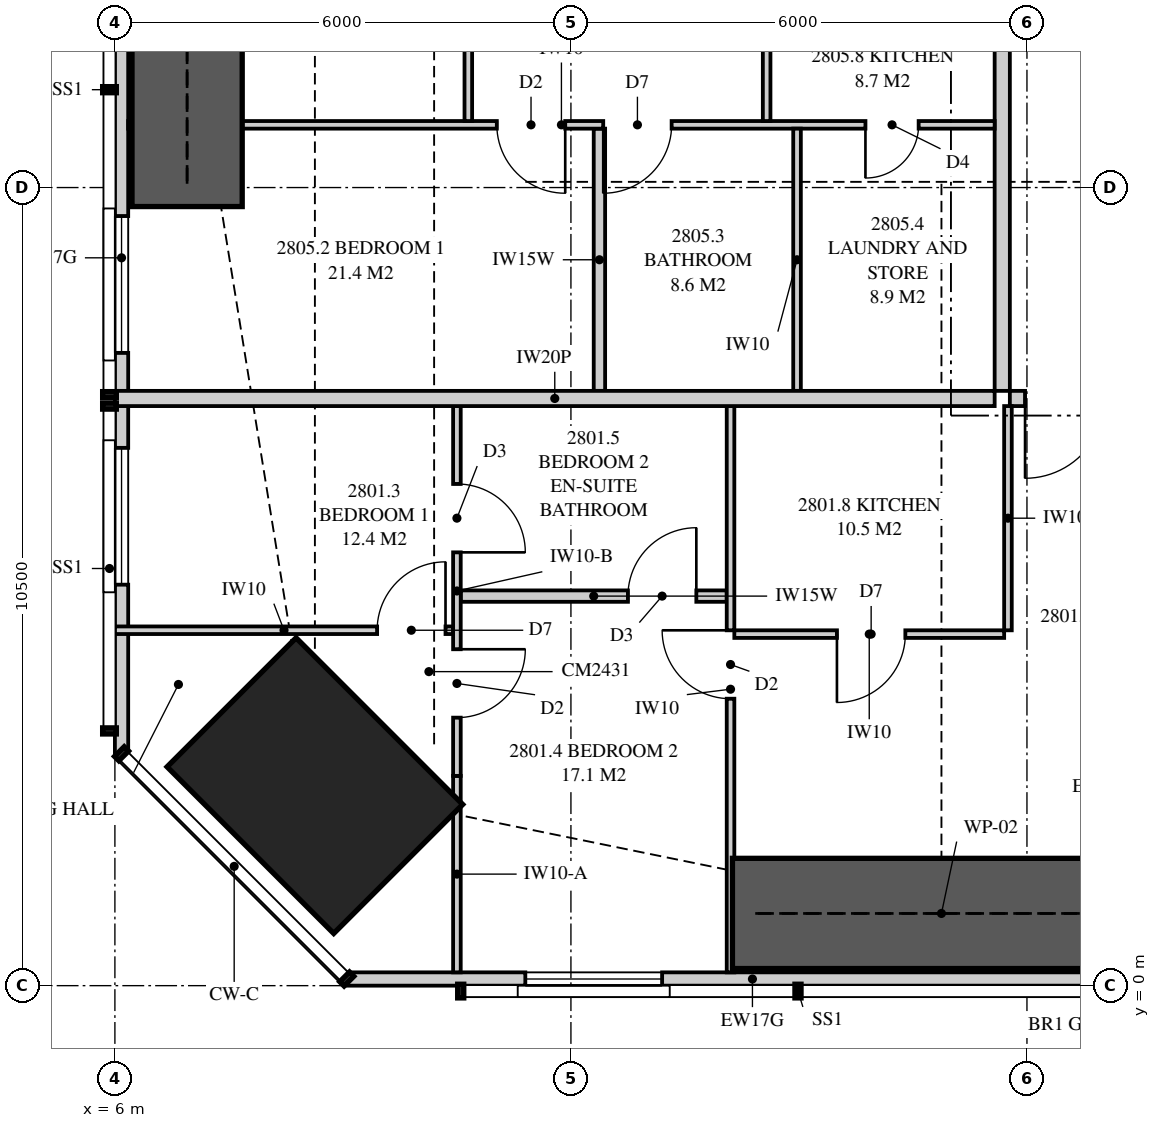
"""IFC4 building model, lengths in metres.
Left out: names, types, materials, properties, quantities, classifications, styles, units other than length and angle.
Written with IfcOpenShell. Run it as: python <this file> out.ifc"""

import sys

from ifc_helpers import new_model, si_unit, direction, frame, frame_2d, origin, origin_2d, place, context, subcontext, project, spatial, polyline, rectangle, outline, extrude, element, fill, save


model = new_model("IFC4")
c1 = context("Model", 3, precision=1e-05, world=origin(), true_north=direction((0.0, 1.0)))
c2 = subcontext(c1, "Body", "Model", "MODEL_VIEW")
j1 = project(units=[si_unit("LENGTHUNIT", "METRE"), si_unit("PLANEANGLEUNIT", "RADIAN")], contexts=[c1])
p1 = place(None, origin())
s1 = spatial("IfcSite", under=j1, at=p1, CompositionType="ELEMENT")
p2 = place(p1, origin())
s2 = spatial("IfcBuilding", under=s1, at=p2, CompositionType="ELEMENT")
p3 = place(p2, frame((0.0, 0.0, 104.85)))
s3 = spatial("IfcBuildingStorey", under=s2, at=p3, CompositionType="ELEMENT", Elevation=104.85)
p4 = place(p3, frame((8.631, 2.631, 0.0), z_axis=(0.0, 0.0, 1.0), x_axis=(0.707106781187, 0.707106781187, 0.0)))
e1 = element("IfcColumn", 1, at=p4, inside=s3, PredefinedType="COLUMN", context=c2, shape_type="SweptSolid", body=[
    extrude(rectangle(XDim=2.4, YDim=3.1, at=origin_2d()), origin(), (0.0, 0.0, 1.0), 3.35),
])
p5 = place(p3, frame((9.051, 0.087, 0.0), z_axis=(0.0, 0.0, 1.0), x_axis=(1.0, 0.0, 0.0)))
e2 = element("IfcWall", 2, at=p5, inside=s3, PredefinedType="SOLIDWALL", context=c2, shape_type="SweptSolid", body=[
    extrude(outline(polyline([(0.0, 0.0), (10.674, 0.0), (10.674, 2.15), (7.824, 2.15), (7.824, 3.11), (7.666, 3.11), (7.666, 2.15), (7.62, 2.15), (7.62, 3.11), (0.0, 3.11), (0.0, 0.0)])), frame((0.0, 0.087, 0.0), z_axis=(0.0, -1.0, 0.0), x_axis=(1.0, 0.0, 0.0)), (0.0, 0.0, 1.0), 0.175),
])
p6 = place(p5, frame((2.349, 0.0, 0.4)))
e3 = element("IfcOpeningElement", 3, at=p6, cuts=e2, PredefinedType="OPENING", context=c2, shape_type="SweptSolid", body=[
    extrude(rectangle(XDim=1.8, YDim=1.7, at=frame_2d((0.9, 0.85))), frame((0.0, 0.097, 0.0), z_axis=(0.0, -1.0, 0.0), x_axis=(1.0, 0.0, 0.0)), (0.0, 0.0, 1.0), 0.195),
])
p7 = place(p3, frame((6.087, 16.1, 0.0), z_axis=(0.0, 0.0, 1.0), x_axis=(0.0, -1.0, 0.0)))
e4 = element("IfcWall", 4, at=p7, inside=s3, PredefinedType="SOLIDWALL", context=c2, shape_type="SweptSolid", body=[
    extrude(outline(polyline([(0.0, 0.0), (13.049, 0.0), (13.049, 3.11), (3.319, 3.11), (3.319, 2.15), (3.226, 2.15), (3.226, 3.11), (3.1, 3.11), (3.1, 2.15), (0.0, 2.15), (0.0, 0.0)])), frame((0.0, 0.087, 0.0), z_axis=(0.0, -1.0, 0.0), x_axis=(1.0, 0.0, 0.0)), (0.0, 0.0, 1.0), 0.175),
])
p8 = place(p7, frame((5.975, 0.0, 0.4)))
e5 = element("IfcOpeningElement", 5, at=p8, cuts=e4, PredefinedType="OPENING", context=c2, shape_type="SweptSolid", body=[
    extrude(rectangle(XDim=1.8, YDim=1.7, at=frame_2d((0.9, 0.85))), frame((0.0, 0.097, 0.0), z_axis=(0.0, -1.0, 0.0), x_axis=(1.0, 0.0, 0.0)), (0.0, 0.0, 1.0), 0.195),
])
p9 = place(p7, frame((9.025, 0.0, 0.4)))
e6 = element("IfcOpeningElement", 6, at=p9, cuts=e4, PredefinedType="OPENING", context=c2, shape_type="SweptSolid", body=[
    extrude(rectangle(XDim=1.8, YDim=1.7, at=frame_2d((0.9, 0.85))), frame((0.0, 0.097, 0.0), z_axis=(0.0, -1.0, 0.0), x_axis=(1.0, 0.0, 0.0)), (0.0, 0.0, 1.0), 0.195),
])
p10 = place(p3, frame((17.775, 7.725, 0.0), z_axis=(0.0, 0.0, 1.0), x_axis=(1.0, 0.0, 0.0)))
e7 = element("IfcWall", 7, at=p10, inside=s3, PredefinedType="PARTITIONING", context=c2, shape_type="SweptSolid", body=[
    extrude(rectangle(XDim=8.225, YDim=0.2, at=frame_2d((4.113, 0.0))), origin(), (0.0, 0.0, 1.0), 3.11),
])
p11 = place(p10, frame((0.2, 0.0, 0.0)))
e8 = element("IfcOpeningElement", 8, at=p11, cuts=e7, PredefinedType="OPENING", context=c2, shape_type="SweptSolid", body=[
    extrude(rectangle(XDim=1.05, YDim=2.2, at=frame_2d((0.525, 1.1))), frame((0.0, 0.11, 0.0), z_axis=(0.0, -1.0, 0.0), x_axis=(1.0, 0.0, 0.0)), (0.0, 0.0, 1.0), 0.22),
])
p12 = place(p3, frame((10.5, 0.175, 0.0), z_axis=(0.0, 0.0, 1.0), x_axis=(0.0, 1.0, 0.0)))
e9 = element("IfcWall", 9, at=p12, inside=s3, PredefinedType="PARTITIONING", context=c2, shape_type="SweptSolid", body=[
    extrude(outline(polyline([(0.0, 0.0), (2.585, 0.0), (2.585, 2.15), (1.198, 2.15), (1.198, 3.11), (0.0, 3.11), (0.0, 0.0)])), frame((0.0, 0.05, 0.0), z_axis=(0.0, -1.0, 0.0), x_axis=(1.0, 0.0, 0.0)), (0.0, 0.0, 1.0), 0.1),
])
p13 = place(p3, frame((10.5, 2.76, 0.0), z_axis=(0.0, 0.0, 1.0), x_axis=(0.0, 1.0, 0.0)))
e10 = element("IfcWall", 10, at=p13, inside=s3, PredefinedType="PARTITIONING", context=c2, shape_type="SweptSolid", body=[
    extrude(outline(polyline([(0.0, 0.0), (4.865, 0.0), (4.865, 2.51), (0.368, 2.51), (0.368, 2.15), (0.0, 2.15), (0.0, 0.0)])), frame((0.0, 0.05, 0.0), z_axis=(0.0, -1.0, 0.0), x_axis=(1.0, 0.0, 0.0)), (0.0, 0.0, 1.0), 0.1),
])
p14 = place(p13, frame((0.766, 0.0, 0.0)))
e11 = element("IfcOpeningElement", 11, at=p14, cuts=e10, PredefinedType="OPENING", context=c2, shape_type="SweptSolid", body=[
    extrude(rectangle(XDim=0.9, YDim=2.1, at=frame_2d((0.45, 1.05))), frame((0.0, 0.06, 0.0), z_axis=(0.0, -1.0, 0.0), x_axis=(1.0, 0.0, 0.0)), (0.0, 0.0, 1.0), 0.12),
])
p15 = place(p13, frame((2.941, 0.0, 0.0)))
e12 = element("IfcOpeningElement", 12, at=p15, cuts=e10, PredefinedType="OPENING", context=c2, shape_type="SweptSolid", body=[
    extrude(rectangle(XDim=0.9, YDim=2.1, at=frame_2d((0.45, 1.05))), frame((0.0, 0.06, 0.0), z_axis=(0.0, -1.0, 0.0), x_axis=(1.0, 0.0, 0.0)), (0.0, 0.0, 1.0), 0.12),
])
p16 = place(p3, frame((14.1, 0.175, 0.0), z_axis=(0.0, 0.0, 1.0), x_axis=(0.0, 1.0, 0.0)))
e13 = element("IfcWall", 13, at=p16, inside=s3, PredefinedType="PARTITIONING", context=c2, shape_type="SweptSolid", body=[
    extrude(outline(polyline([(0.0, 0.0), (7.45, 0.0), (7.45, 3.11), (2.219, 3.11), (2.219, 2.15), (0.463, 2.15), (0.463, 3.11), (0.0, 3.11), (0.0, 0.0)])), frame((0.0, 0.05, 0.0), z_axis=(0.0, -1.0, 0.0), x_axis=(1.0, 0.0, 0.0)), (0.0, 0.0, 1.0), 0.1),
])
p17 = place(p16, frame((3.6, 0.0, 0.0)))
e14 = element("IfcOpeningElement", 14, at=p17, cuts=e13, PredefinedType="OPENING", context=c2, shape_type="SweptSolid", body=[
    extrude(rectangle(XDim=0.9, YDim=2.1, at=frame_2d((0.45, 1.05))), frame((0.0, 0.06, 0.0), z_axis=(0.0, -1.0, 0.0), x_axis=(1.0, 0.0, 0.0)), (0.0, 0.0, 1.0), 0.12),
])
p18 = place(p3, frame((6.0, 4.676, 0.0), z_axis=(0.0, 0.0, 1.0), x_axis=(1.0, 0.0, 0.0)))
e15 = element("IfcWall", 15, at=p18, inside=s3, PredefinedType="PARTITIONING", context=c2, shape_type="SweptSolid", body=[
    extrude(outline(polyline([(0.0, 0.0), (4.45, 0.0), (4.45, 3.11), (4.45, 2.51), (3.171, 2.51), (3.171, 2.15), (1.429, 2.15), (1.429, 3.11), (0.0, 3.11), (0.0, 0.0)])), frame((0.0, 0.05, 0.0), z_axis=(0.0, -1.0, 0.0), x_axis=(1.0, 0.0, 0.0)), (0.0, 0.0, 1.0), 0.1),
])
p19 = place(p18, frame((3.45, 0.0, 0.0)))
e16 = element("IfcOpeningElement", 16, at=p19, cuts=e15, PredefinedType="OPENING", context=c2, shape_type="SweptSolid", body=[
    extrude(rectangle(XDim=0.9, YDim=2.1, at=frame_2d((0.45, 1.05))), frame((0.0, 0.06, 0.0), z_axis=(0.0, -1.0, 0.0), x_axis=(1.0, 0.0, 0.0)), (0.0, 0.0, 1.0), 0.12),
])
p20 = place(p3, frame((10.55, 5.125, 0.0), z_axis=(0.0, 0.0, 1.0), x_axis=(1.0, 0.0, 0.0)))
e17 = element("IfcWall", 17, at=p20, inside=s3, PredefinedType="PLUMBINGWALL", context=c2, shape_type="SweptSolid", body=[
    extrude(outline(polyline([(0.0, 0.0), (3.5, 0.0), (3.5, 3.11), (0.935, 3.11), (0.935, 2.51), (0.0, 2.51), (0.0, 3.11), (0.0, 0.0)])), frame((0.0, 0.075, 0.0), z_axis=(0.0, -1.0, 0.0), x_axis=(1.0, 0.0, 0.0)), (0.0, 0.0, 1.0), 0.15),
])
p21 = place(p20, frame((2.2, 0.0, 0.0)))
e18 = element("IfcOpeningElement", 18, at=p21, cuts=e17, PredefinedType="OPENING", context=c2, shape_type="SweptSolid", body=[
    extrude(rectangle(XDim=0.9, YDim=2.1, at=frame_2d((0.45, 1.05))), frame((0.0, 0.085, 0.0), z_axis=(0.0, -1.0, 0.0), x_axis=(1.0, 0.0, 0.0)), (0.0, 0.0, 1.0), 0.17),
])
p22 = place(p3, frame((14.15, 4.625, 0.0), z_axis=(0.0, 0.0, 1.0), x_axis=(1.0, 0.0, 0.0)))
e19 = element("IfcWall", 19, at=p22, inside=s3, PredefinedType="PARTITIONING", context=c2, shape_type="SweptSolid", body=[
    extrude(outline(polyline([(0.0, 0.0), (3.55, 0.0), (3.55, 3.11), (3.012, 3.11), (3.012, 2.541), (2.438, 2.541), (2.438, 3.11), (0.0, 3.11), (0.0, 0.0)])), frame((0.0, 0.05, 0.0), z_axis=(0.0, -1.0, 0.0), x_axis=(1.0, 0.0, 0.0)), (0.0, 0.0, 1.0), 0.1),
])
p23 = place(p22, frame((1.35, 0.0, 0.0)))
e20 = element("IfcOpeningElement", 20, at=p23, cuts=e19, PredefinedType="OPENING", context=c2, shape_type="SweptSolid", body=[
    extrude(rectangle(XDim=0.9, YDim=2.1, at=frame_2d((0.45, 1.05))), frame((0.0, 0.06, 0.0), z_axis=(0.0, -1.0, 0.0), x_axis=(1.0, 0.0, 0.0)), (0.0, 0.0, 1.0), 0.12),
])
p24 = place(p3, frame((17.75, 4.675, 0.0), z_axis=(0.0, 0.0, 1.0), x_axis=(0.0, 1.0, 0.0)))
e21 = element("IfcWall", 21, at=p24, inside=s3, PredefinedType="PARTITIONING", context=c2, shape_type="SweptSolid", body=[
    extrude(rectangle(XDim=2.95, YDim=0.1, at=frame_2d((1.475, 0.0))), origin(), (0.0, 0.0, 1.0), 3.11),
])
p25 = place(p3, frame((6.0, 7.725, 0.0), z_axis=(0.0, 0.0, 1.0), x_axis=(1.0, 0.0, 0.0)))
e22 = element("IfcWall", 22, at=p25, inside=s3, PredefinedType="PARTITIONING", context=c2, shape_type="SweptSolid", body=[
    extrude(outline(polyline([(0.0, 0.0), (11.575, 0.0), (11.575, 3.11), (11.212, 3.11), (11.212, 2.541), (10.538, 2.541), (10.538, 3.11), (5.51, 3.11), (5.51, 2.51), (2.969, 2.51), (2.969, 2.541), (2.727, 2.541), (2.727, 2.15), (0.884, 2.15), (0.884, 3.11), (0.0, 3.11), (0.0, 0.0)])), frame((0.0, 0.1, 0.0), z_axis=(0.0, -1.0, 0.0), x_axis=(1.0, 0.0, 0.0)), (0.0, 0.0, 1.0), 0.2),
])
p26 = place(p3, frame((17.675, 7.825, 0.0), z_axis=(0.0, 0.0, 1.0), x_axis=(0.0, 1.0, 0.0)))
e23 = element("IfcWall", 23, at=p26, inside=s3, PredefinedType="PARTITIONING", context=c2, shape_type="SweptSolid", body=[
    extrude(outline(polyline([(0.0, 0.0), (6.637, 0.0), (6.637, 3.11), (3.087, 3.11), (3.087, 2.541), (2.413, 2.541), (2.413, 3.11), (0.0, 3.11), (0.0, 0.0)])), frame((0.0, 0.1, 0.0), z_axis=(0.0, -1.0, 0.0), x_axis=(1.0, 0.0, 0.0)), (0.0, 0.0, 1.0), 0.2),
])
p27 = place(p3, frame((6.175, 11.325, 0.0), z_axis=(0.0, 0.0, 1.0), x_axis=(1.0, 0.0, 0.0)))
e24 = element("IfcWall", 24, at=p27, inside=s3, PredefinedType="PARTITIONING", context=c2, shape_type="SweptSolid", body=[
    extrude(outline(polyline([(0.175, 3.11), (0.0, 3.11), (0.0, 0.0), (0.529, 0.0), (0.529, 0.325), (1.021, 0.325), (1.021, 0.0), (11.4, 0.0), (11.4, 3.11), (5.285, 3.11), (5.285, 2.51), (2.765, 2.51), (2.765, 3.11), (2.744, 3.11), (2.744, 2.541), (2.169, 2.541), (2.169, 3.11), (1.918, 3.11), (1.918, 2.15), (1.021, 2.15), (1.021, 1.825), (0.529, 1.825), (0.529, 2.15), (0.175, 2.15), (0.175, 3.11)])), frame((0.0, 0.05, 0.0), z_axis=(0.0, -1.0, 0.0), x_axis=(1.0, 0.0, 0.0)), (0.0, 0.0, 1.0), 0.1),
])
p28 = place(p27, frame((4.85, 0.0, 0.0)))
e25 = element("IfcOpeningElement", 25, at=p28, cuts=e24, PredefinedType="OPENING", context=c2, shape_type="SweptSolid", body=[
    extrude(rectangle(XDim=0.9, YDim=2.1, at=frame_2d((0.45, 1.05))), frame((0.0, 0.06, 0.0), z_axis=(0.0, -1.0, 0.0), x_axis=(1.0, 0.0, 0.0)), (0.0, 0.0, 1.0), 0.12),
])
p29 = place(p27, frame((6.25, 0.0, 0.0)))
e26 = element("IfcOpeningElement", 26, at=p29, cuts=e24, PredefinedType="OPENING", context=c2, shape_type="SweptSolid", body=[
    extrude(rectangle(XDim=0.9, YDim=2.1, at=frame_2d((0.45, 1.05))), frame((0.0, 0.06, 0.0), z_axis=(0.0, -1.0, 0.0), x_axis=(1.0, 0.0, 0.0)), (0.0, 0.0, 1.0), 0.12),
])
p30 = place(p27, frame((9.7, 0.0, 0.0)))
e27 = element("IfcOpeningElement", 27, at=p30, cuts=e24, PredefinedType="OPENING", context=c2, shape_type="SweptSolid", body=[
    extrude(rectangle(XDim=0.7, YDim=2.1, at=frame_2d((0.35, 1.05))), frame((0.0, 0.06, 0.0), z_axis=(0.0, -1.0, 0.0), x_axis=(1.0, 0.0, 0.0)), (0.0, 0.0, 1.0), 0.12),
])
p31 = place(p3, frame((12.375, 7.825, 0.0), z_axis=(0.0, 0.0, 1.0), x_axis=(0.0, 1.0, 0.0)))
e28 = element("IfcWall", 28, at=p31, inside=s3, PredefinedType="PLUMBINGWALL", context=c2, shape_type="SweptSolid", body=[
    extrude(outline(polyline([(0.0, 0.0), (3.45, 0.0), (3.45, 3.11), (3.062, 3.11), (3.062, 2.541), (2.438, 2.541), (2.438, 3.11), (0.0, 3.11), (0.0, 0.0)])), frame((0.0, 0.075, 0.0), z_axis=(0.0, -1.0, 0.0), x_axis=(1.0, 0.0, 0.0)), (0.0, 0.0, 1.0), 0.15),
])
p32 = place(p3, frame((14.975, 7.825, 0.0), z_axis=(0.0, 0.0, 1.0), x_axis=(0.0, 1.0, 0.0)))
e29 = element("IfcWall", 29, at=p32, inside=s3, PredefinedType="PARTITIONING", context=c2, shape_type="SweptSolid", body=[
    extrude(outline(polyline([(0.0, 0.0), (3.45, 0.0), (3.45, 3.11), (3.037, 3.11), (3.037, 2.541), (2.463, 2.541), (2.463, 3.11), (0.0, 3.11), (0.0, 0.0)])), frame((0.0, 0.05, 0.0), z_axis=(0.0, -1.0, 0.0), x_axis=(1.0, 0.0, 0.0)), (0.0, 0.0, 1.0), 0.1),
])
p33 = place(p3, frame((14.575, 11.375, 0.0), z_axis=(0.0, 0.0, 1.0), x_axis=(0.0, 1.0, 0.0)))
e30 = element("IfcWall", 30, at=p33, inside=s3, PredefinedType="PARTITIONING", context=c2, shape_type="SweptSolid", body=[
    extrude(rectangle(XDim=2.95, YDim=0.1, at=frame_2d((1.475, 0.0))), origin(), (0.0, 0.0, 1.0), 3.11),
])
p34 = place(p33, frame((1.05, 0.0, 0.0)))
e31 = element("IfcOpeningElement", 31, at=p34, cuts=e30, PredefinedType="OPENING", context=c2, shape_type="SweptSolid", body=[
    extrude(rectangle(XDim=0.9, YDim=2.1, at=frame_2d((0.45, 1.05))), frame((0.0, 0.06, 0.0), z_axis=(0.0, -1.0, 0.0), x_axis=(1.0, 0.0, 0.0)), (0.0, 0.0, 1.0), 0.12),
])
p35 = place(p3, frame((10.65, 11.375, 0.0), z_axis=(0.0, 0.0, 1.0), x_axis=(0.0, 1.0, 0.0)))
e32 = element("IfcWall", 32, at=p35, inside=s3, PredefinedType="PARTITIONING", context=c2, shape_type="SweptSolid", body=[
    extrude(outline(polyline([(0.0, 0.0), (7.775, 0.0), (7.775, 3.11), (7.775, 2.51), (1.685, 2.51), (0.0, 2.51), (0.0, 3.11), (0.0, 0.0)])), frame((0.0, 0.05, 0.0), z_axis=(0.0, -1.0, 0.0), x_axis=(1.0, 0.0, 0.0)), (0.0, 0.0, 1.0), 0.1),
])
p36 = place(p35, frame((3.387, 0.0, 0.0)))
e33 = element("IfcOpeningElement", 33, at=p36, cuts=e32, PredefinedType="OPENING", context=c2, shape_type="SweptSolid", body=[
    extrude(rectangle(XDim=1.0, YDim=2.1, at=frame_2d((0.5, 1.05))), frame((0.0, 0.06, 0.0), z_axis=(0.0, -1.0, 0.0), x_axis=(1.0, 0.0, 0.0)), (0.0, 0.0, 1.0), 0.12),
])
for number, where, z_axis, x_axis in (
    (34, (14.125, 0.95, 0.0), (0.0, 0.0, 1.0), (1.0, 0.0, 0.0)),
    (35, (6.95, 10.25, 0.0), (0.0, 0.0, 1.0), (0.0, 1.0, 0.0)),
):
    element("IfcWall", number, at=place(p3, frame(where, z_axis=z_axis, x_axis=x_axis)), inside=s3, PredefinedType="SHEAR", context=c2, shape_type="SweptSolid", body=[
        extrude(rectangle(XDim=5.5, YDim=1.45, at=frame_2d((2.75, 0.0))), origin(), (0.0, 0.0, 1.0), 3.35),
    ])
p37 = place(p6, origin())
e36 = element("IfcWindow", 36, at=p37, inside=s3, PartitioningType="SINGLE_PANEL", PredefinedType="WINDOW", context=c2, shape_type="SweptSolid", body=[
    extrude(rectangle(XDim=1.8, YDim=1.7, at=frame_2d((0.9, 0.85))), frame((0.0, 0.03, 0.0), z_axis=(0.0, -1.0, 0.0), x_axis=(1.0, 0.0, 0.0)), (0.0, 0.0, 1.0), 0.06),
])
fill(e3, e36)
p38 = place(p8, origin())
e37 = element("IfcWindow", 37, at=p38, inside=s3, PartitioningType="SINGLE_PANEL", PredefinedType="WINDOW", context=c2, shape_type="SweptSolid", body=[
    extrude(rectangle(XDim=1.8, YDim=1.7, at=frame_2d((0.9, 0.85))), frame((0.0, 0.03, 0.0), z_axis=(0.0, -1.0, 0.0), x_axis=(1.0, 0.0, 0.0)), (0.0, 0.0, 1.0), 0.06),
])
fill(e5, e37)
p39 = place(p9, origin())
e38 = element("IfcWindow", 38, at=p39, inside=s3, PartitioningType="SINGLE_PANEL", PredefinedType="WINDOW", context=c2, shape_type="SweptSolid", body=[
    extrude(rectangle(XDim=1.8, YDim=1.7, at=frame_2d((0.9, 0.85))), frame((0.0, 0.03, 0.0), z_axis=(0.0, -1.0, 0.0), x_axis=(1.0, 0.0, 0.0)), (0.0, 0.0, 1.0), 0.06),
])
fill(e6, e38)
p40 = place(p11, frame((1.05, 0.0, 0.0), z_axis=(0.0, 0.0, 1.0), x_axis=(-1.0, 0.0, 0.0)))
e39 = element("IfcDoor", 39, at=p40, inside=s3, OperationType="SINGLE_SWING_RIGHT", PredefinedType="DOOR", context=c2, shape_type="SweptSolid", body=[
    extrude(rectangle(XDim=1.05, YDim=2.2, at=frame_2d((0.525, 1.1))), frame((0.0, 0.025, 0.0), z_axis=(0.0, -1.0, 0.0), x_axis=(1.0, 0.0, 0.0)), (0.0, 0.0, 1.0), 0.05),
])
fill(e8, e39)
p41 = place(p19, origin())
e40 = element("IfcDoor", 40, at=p41, inside=s3, OperationType="SINGLE_SWING_RIGHT", PredefinedType="DOOR", context=c2, shape_type="SweptSolid", body=[
    extrude(rectangle(XDim=0.9, YDim=2.1, at=frame_2d((0.45, 1.05))), frame((0.0, 0.025, 0.0), z_axis=(0.0, -1.0, 0.0), x_axis=(1.0, 0.0, 0.0)), (0.0, 0.0, 1.0), 0.05),
])
fill(e16, e40)
p42 = place(p14, frame((0.9, 0.0, 0.0), z_axis=(0.0, 0.0, 1.0), x_axis=(-1.0, 0.0, 0.0)))
e41 = element("IfcDoor", 41, at=p42, inside=s3, OperationType="SINGLE_SWING_LEFT", PredefinedType="DOOR", context=c2, shape_type="SweptSolid", body=[
    extrude(rectangle(XDim=0.9, YDim=2.1, at=frame_2d((0.45, 1.05))), frame((0.0, 0.025, 0.0), z_axis=(0.0, -1.0, 0.0), x_axis=(1.0, 0.0, 0.0)), (0.0, 0.0, 1.0), 0.05),
])
fill(e11, e41)
p43 = place(p17, origin())
e42 = element("IfcDoor", 42, at=p43, inside=s3, OperationType="SINGLE_SWING_RIGHT", PredefinedType="DOOR", context=c2, shape_type="SweptSolid", body=[
    extrude(rectangle(XDim=0.9, YDim=2.1, at=frame_2d((0.45, 1.05))), frame((0.0, 0.025, 0.0), z_axis=(0.0, -1.0, 0.0), x_axis=(1.0, 0.0, 0.0)), (0.0, 0.0, 1.0), 0.05),
])
fill(e14, e42)
p44 = place(p21, origin())
e43 = element("IfcDoor", 43, at=p44, inside=s3, OperationType="SINGLE_SWING_RIGHT", PredefinedType="DOOR", context=c2, shape_type="SweptSolid", body=[
    extrude(rectangle(XDim=0.9, YDim=2.1, at=frame_2d((0.45, 1.05))), frame((0.0, 0.025, 0.0), z_axis=(0.0, -1.0, 0.0), x_axis=(1.0, 0.0, 0.0)), (0.0, 0.0, 1.0), 0.05),
])
fill(e18, e43)
p45 = place(p15, frame((0.9, 0.0, 0.0), z_axis=(0.0, 0.0, 1.0), x_axis=(-1.0, 0.0, 0.0)))
e44 = element("IfcDoor", 44, at=p45, inside=s3, OperationType="SINGLE_SWING_RIGHT", PredefinedType="DOOR", context=c2, shape_type="SweptSolid", body=[
    extrude(rectangle(XDim=0.9, YDim=2.1, at=frame_2d((0.45, 1.05))), frame((0.0, 0.025, 0.0), z_axis=(0.0, -1.0, 0.0), x_axis=(1.0, 0.0, 0.0)), (0.0, 0.0, 1.0), 0.05),
])
fill(e12, e44)
p46 = place(p23, frame((0.9, 0.0, 0.0), z_axis=(0.0, 0.0, 1.0), x_axis=(-1.0, 0.0, 0.0)))
e45 = element("IfcDoor", 45, at=p46, inside=s3, OperationType="SINGLE_SWING_RIGHT", PredefinedType="DOOR", context=c2, shape_type="SweptSolid", body=[
    extrude(rectangle(XDim=0.9, YDim=2.1, at=frame_2d((0.45, 1.05))), frame((0.0, 0.025, 0.0), z_axis=(0.0, -1.0, 0.0), x_axis=(1.0, 0.0, 0.0)), (0.0, 0.0, 1.0), 0.05),
])
fill(e20, e45)
p47 = place(p28, frame((0.9, 0.0, 0.0), z_axis=(0.0, 0.0, 1.0), x_axis=(-1.0, 0.0, 0.0)))
e46 = element("IfcDoor", 46, at=p47, inside=s3, OperationType="SINGLE_SWING_LEFT", PredefinedType="DOOR", context=c2, shape_type="SweptSolid", body=[
    extrude(rectangle(XDim=0.9, YDim=2.1, at=frame_2d((0.45, 1.05))), frame((0.0, 0.025, 0.0), z_axis=(0.0, -1.0, 0.0), x_axis=(1.0, 0.0, 0.0)), (0.0, 0.0, 1.0), 0.05),
])
fill(e25, e46)
p48 = place(p29, frame((0.9, 0.0, 0.0), z_axis=(0.0, 0.0, 1.0), x_axis=(-1.0, 0.0, 0.0)))
e47 = element("IfcDoor", 47, at=p48, inside=s3, OperationType="SINGLE_SWING_RIGHT", PredefinedType="DOOR", context=c2, shape_type="SweptSolid", body=[
    extrude(rectangle(XDim=0.9, YDim=2.1, at=frame_2d((0.45, 1.05))), frame((0.0, 0.025, 0.0), z_axis=(0.0, -1.0, 0.0), x_axis=(1.0, 0.0, 0.0)), (0.0, 0.0, 1.0), 0.05),
])
fill(e26, e47)
p49 = place(p30, frame((0.7, 0.0, 0.0), z_axis=(0.0, 0.0, 1.0), x_axis=(-1.0, 0.0, 0.0)))
e48 = element("IfcDoor", 48, at=p49, inside=s3, OperationType="SINGLE_SWING_RIGHT", PredefinedType="DOOR", context=c2, shape_type="SweptSolid", body=[
    extrude(rectangle(XDim=0.7, YDim=2.1, at=frame_2d((0.35, 1.05))), frame((0.0, 0.025, 0.0), z_axis=(0.0, -1.0, 0.0), x_axis=(1.0, 0.0, 0.0)), (0.0, 0.0, 1.0), 0.05),
])
fill(e27, e48)
save(model, sys.argv[1])
